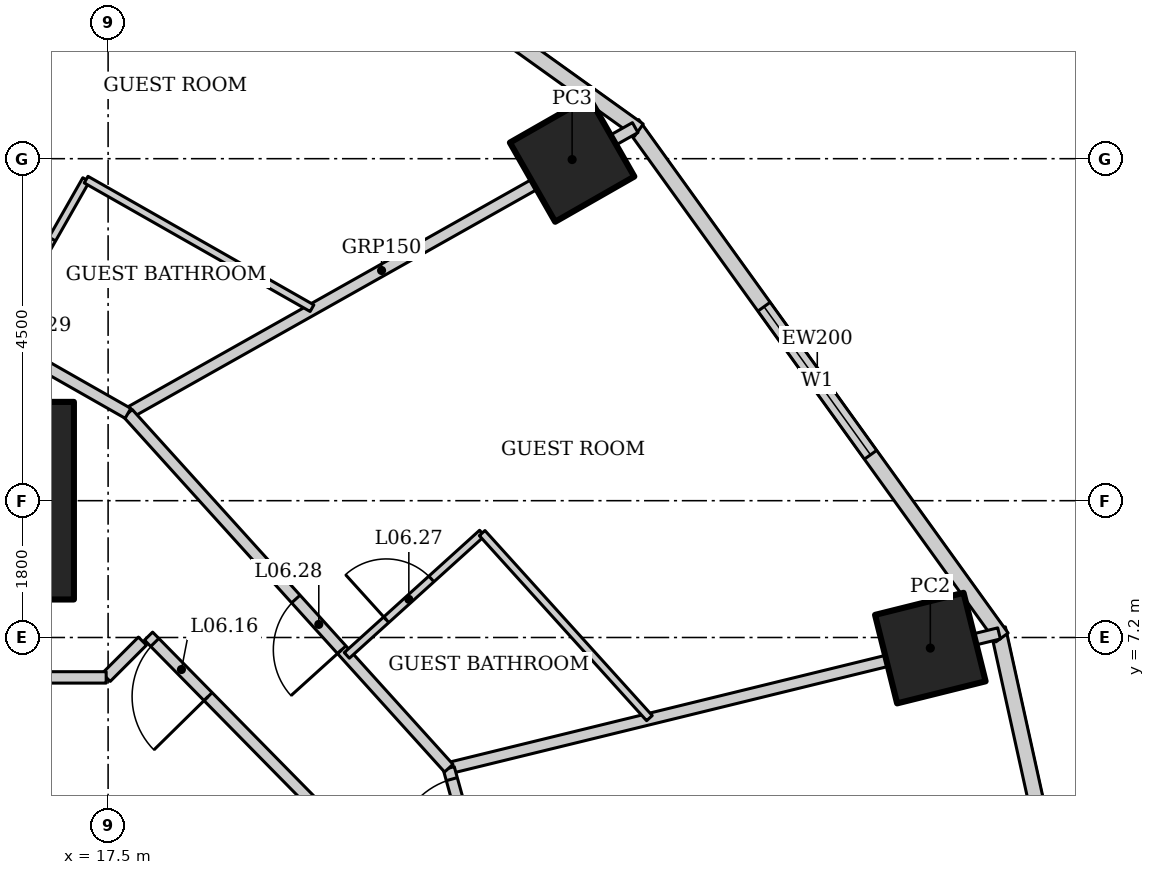
"""IFC4 building model, lengths in metres.
Left out: names, types, materials, properties, quantities, classifications, styles, units other than length and angle.
Written with IfcOpenShell. Run it as: python <this file> out.ifc"""

import sys

from ifc_helpers import new_model, si_unit, direction, frame, frame_2d, origin, origin_2d, place, context, subcontext, project, spatial, rectangle, hollow_rectangle, extrude, element, fill, save


model = new_model("IFC4")
c1 = context("Model", 3, precision=1e-05, world=origin(), true_north=direction((0.0, 1.0)))
c2 = subcontext(c1, "Body", "Model", "MODEL_VIEW")
j1 = project(units=[si_unit("LENGTHUNIT", "METRE"), si_unit("PLANEANGLEUNIT", "RADIAN")], contexts=[c1])
p1 = place(None, origin())
s1 = spatial("IfcSite", under=j1, at=p1, CompositionType="ELEMENT")
p2 = place(p1, origin())
s2 = spatial("IfcBuilding", under=s1, at=p2, CompositionType="ELEMENT")
p3 = place(p2, frame((0.0, 0.0, 37.0)))
s3 = spatial("IfcBuildingStorey", under=s2, at=p3, CompositionType="ELEMENT", Elevation=37.0)
p4 = place(p3, frame((15.75, 9.0, 0.0), z_axis=(0.0, 0.0, 1.0), x_axis=(1.0, 0.0, 0.0)))
e1 = element("IfcColumn", 1, at=p4, inside=s3, PredefinedType="COLUMN", context=c2, shape_type="SweptSolid", body=[
    extrude(hollow_rectangle(XDim=2.6, YDim=2.6, WallThickness=0.13, at=origin_2d()), origin(), (0.0, 0.0, 1.0), 3.6),
])
p5 = place(p3, frame((28.318, 7.06, 0.0), z_axis=(0.0, 0.0, 1.0), x_axis=(0.970295726276, 0.2419218956, 0.0)))
e2 = element("IfcColumn", 2, at=p5, inside=s3, PredefinedType="COLUMN", context=c2, shape_type="SweptSolid", body=[
    extrude(hollow_rectangle(XDim=1.2, YDim=1.2, WallThickness=0.1, at=origin_2d()), origin(), (0.0, 0.0, 1.0), 3.6),
])
p6 = place(p3, frame((23.605, 13.489, 0.0), z_axis=(0.0, 0.0, 1.0), x_axis=(0.86824298017, 0.496139221777, 0.0)))
e3 = element("IfcColumn", 3, at=p6, inside=s3, PredefinedType="COLUMN", context=c2, shape_type="SweptSolid", body=[
    extrude(hollow_rectangle(XDim=1.2, YDim=1.2, WallThickness=0.12, at=origin_2d()), origin(), (0.0, 0.0, 1.0), 3.6),
])
p7 = place(p3, frame((30.835, -0.067, 0.0), z_axis=(0.0, 0.0, 1.0), x_axis=(-0.215238065514, 0.976561608478, 0.0)))
e4 = element("IfcWall", 4, at=p7, inside=s3, PredefinedType="SOLIDWALL", context=c2, shape_type="SweptSolid", body=[
    extrude(rectangle(XDim=7.562, YDim=0.2, at=frame_2d((3.781, 0.0))), origin(), (0.0, 0.0, 1.0), 3.45),
])
p8 = place(p7, frame((2.581, 0.0, 0.5)))
e5 = element("IfcOpeningElement", 5, at=p8, cuts=e4, PredefinedType="OPENING", context=c2, shape_type="SweptSolid", body=[
    extrude(rectangle(XDim=2.4, YDim=2.2, at=frame_2d((1.2, 1.1))), frame((0.0, 0.11, 0.0), z_axis=(0.0, -1.0, 0.0), x_axis=(1.0, 0.0, 0.0)), (0.0, 0.0, 1.0), 0.22),
])
p9 = place(p3, frame((29.26, 7.2, 0.0), z_axis=(0.0, 0.0, 1.0), x_axis=(-0.583937613703, 0.811798536155, 0.0)))
e6 = element("IfcWall", 6, at=p9, inside=s3, PredefinedType="SOLIDWALL", context=c2, shape_type="SweptSolid", body=[
    extrude(rectangle(XDim=8.323, YDim=0.2, at=frame_2d((4.162, 0.0))), origin(), (0.0, 0.0, 1.0), 3.45),
])
p10 = place(p9, frame((2.961, 0.0, 0.5)))
e7 = element("IfcOpeningElement", 7, at=p10, cuts=e6, PredefinedType="OPENING", context=c2, shape_type="SweptSolid", body=[
    extrude(rectangle(XDim=2.4, YDim=2.2, at=frame_2d((1.2, 1.1))), frame((0.0, 0.11, 0.0), z_axis=(0.0, -1.0, 0.0), x_axis=(1.0, 0.0, 0.0)), (0.0, 0.0, 1.0), 0.22),
])
p11 = place(p3, frame((24.482, 13.875, 0.0), z_axis=(0.0, 0.0, 1.0), x_axis=(-0.812791321576, 0.582554948112, 0.0)))
e8 = element("IfcWall", 8, at=p11, inside=s3, PredefinedType="SOLIDWALL", context=c2, shape_type="SweptSolid", body=[
    extrude(rectangle(XDim=8.063, YDim=0.2, at=frame_2d((4.032, 0.0))), origin(), (0.0, 0.0, 1.0), 3.45),
])
p12 = place(p11, frame((2.832, 0.0, 0.5)))
e9 = element("IfcOpeningElement", 9, at=p12, cuts=e8, PredefinedType="OPENING", context=c2, shape_type="SweptSolid", body=[
    extrude(rectangle(XDim=2.4, YDim=2.2, at=frame_2d((1.2, 1.1))), frame((0.0, 0.11, 0.0), z_axis=(0.0, -1.0, 0.0), x_axis=(1.0, 0.0, 0.0)), (0.0, 0.0, 1.0), 0.22),
])
p13 = place(p3, frame((29.222, 7.254, 0.0), z_axis=(0.0, 0.0, 1.0), x_axis=(-0.97130070913, -0.237854855832, 0.0)))
e10 = element("IfcWall", 10, at=p13, inside=s3, PredefinedType="PARTITIONING", context=c2, shape_type="SweptSolid", body=[
    extrude(rectangle(XDim=7.454, YDim=0.15, at=frame_2d((3.727, 0.0))), origin(), (0.0, 0.0, 1.0), 2.333),
])
p14 = place(p3, frame((24.435, 13.909, 0.0), z_axis=(0.0, 0.0, 1.0), x_axis=(-0.871267209855, -0.490808974074, 0.0)))
e11 = element("IfcWall", 11, at=p14, inside=s3, PredefinedType="PARTITIONING", context=c2, shape_type="SweptSolid", body=[
    extrude(rectangle(XDim=7.659, YDim=0.15, at=frame_2d((3.83, 0.0))), origin(), (0.0, 0.0, 1.0), 2.693),
])
p15 = place(p3, frame((17.97, 18.542, 0.0), z_axis=(0.0, 0.0, 1.0), x_axis=(-0.699032031211, -0.715090357467, 0.0)))
e12 = element("IfcWall", 12, at=p15, inside=s3, PredefinedType="PARTITIONING", context=c2, shape_type="SweptSolid", body=[
    extrude(rectangle(XDim=7.647, YDim=0.15, at=frame_2d((3.824, 0.0))), origin(), (0.0, 0.0, 1.0), 2.528),
])
p16 = place(p3, frame((23.5, 0.0, 0.0), z_axis=(0.0, 0.0, 1.0), x_axis=(-0.266933062421, 0.963715072097, 0.0)))
e13 = element("IfcWall", 13, at=p16, inside=s3, PredefinedType="PARTITIONING", context=c2, shape_type="SweptSolid", body=[
    extrude(rectangle(XDim=5.687, YDim=0.15, at=frame_2d((2.844, 0.0))), origin(), (0.0, 0.0, 1.0), 3.45),
])
p17 = place(p16, frame((4.537, 0.0, 0.0)))
e14 = element("IfcOpeningElement", 14, at=p17, cuts=e13, PredefinedType="OPENING", context=c2, shape_type="SweptSolid", body=[
    extrude(rectangle(XDim=1.0, YDim=2.1, at=frame_2d((0.5, 1.05))), frame((0.0, 0.085, 0.0), z_axis=(0.0, -1.0, 0.0), x_axis=(1.0, 0.0, 0.0)), (0.0, 0.0, 1.0), 0.17),
])
p18 = place(p3, frame((21.982, 5.481, 0.0), z_axis=(0.0, 0.0, 1.0), x_axis=(-0.670598380282, 0.741820606591, 0.0)))
e15 = element("IfcWall", 15, at=p18, inside=s3, PredefinedType="PARTITIONING", context=c2, shape_type="SweptSolid", body=[
    extrude(rectangle(XDim=6.293, YDim=0.15, at=frame_2d((3.147, 0.0))), origin(), (0.0, 0.0, 1.0), 3.45),
])
p19 = place(p18, frame((2.1, 0.0, 0.0)))
e16 = element("IfcOpeningElement", 16, at=p19, cuts=e15, PredefinedType="OPENING", context=c2, shape_type="SweptSolid", body=[
    extrude(rectangle(XDim=0.9, YDim=2.1, at=frame_2d((0.45, 1.05))), frame((0.0, 0.085, 0.0), z_axis=(0.0, -1.0, 0.0), x_axis=(1.0, 0.0, 0.0)), (0.0, 0.0, 1.0), 0.17),
])
p20 = place(p3, frame((17.761, 10.149, 0.0), z_axis=(0.0, 0.0, 1.0), x_axis=(-0.86907565943, 0.494679187136, 0.0)))
e17 = element("IfcWall", 17, at=p20, inside=s3, PredefinedType="PARTITIONING", context=c2, shape_type="SweptSolid", body=[
    extrude(rectangle(XDim=5.911, YDim=0.15, at=frame_2d((2.955, 0.0))), origin(), (0.0, 0.0, 1.0), 3.45),
])
p21 = place(p20, frame((2.55, 0.0, 0.0)))
e18 = element("IfcOpeningElement", 18, at=p21, cuts=e17, PredefinedType="OPENING", context=c2, shape_type="SweptSolid", body=[
    extrude(rectangle(XDim=0.9, YDim=2.1, at=frame_2d((0.45, 1.05))), frame((0.0, 0.085, 0.0), z_axis=(0.0, -1.0, 0.0), x_axis=(1.0, 0.0, 0.0)), (0.0, 0.0, 1.0), 0.17),
])
p22 = place(p3, frame((20.641, 6.964, 0.0), z_axis=(0.0, 0.0, 1.0), x_axis=(0.741861025859, 0.670553665496, 0.0)))
e19 = element("IfcWall", 19, at=p22, inside=s3, PredefinedType="PARTITIONING", context=c2, shape_type="SweptSolid", body=[
    extrude(rectangle(XDim=2.4, YDim=0.1, at=frame_2d((1.2, 0.0))), origin(), (0.0, 0.0, 1.0), 3.45),
])
p23 = place(p22, frame((0.7, 0.0, 0.0)))
e20 = element("IfcOpeningElement", 20, at=p23, cuts=e19, PredefinedType="OPENING", context=c2, shape_type="SweptSolid", body=[
    extrude(rectangle(XDim=0.8, YDim=2.1, at=frame_2d((0.4, 1.05))), frame((0.0, 0.06, 0.0), z_axis=(0.0, -1.0, 0.0), x_axis=(1.0, 0.0, 0.0)), (0.0, 0.0, 1.0), 0.12),
])
p24 = place(p3, frame((22.421, 8.574, 0.0), z_axis=(0.0, 0.0, 1.0), x_axis=(0.670578246017, -0.741838807268, 0.0)))
e21 = element("IfcWall", 21, at=p24, inside=s3, PredefinedType="PARTITIONING", context=c2, shape_type="SweptSolid", body=[
    extrude(rectangle(XDim=3.282, YDim=0.1, at=frame_2d((1.641, 0.0))), origin(), (0.0, 0.0, 1.0), 3.45),
])
p25 = place(p3, frame((16.023, 11.139, 0.0), z_axis=(0.0, 0.0, 1.0), x_axis=(0.494659381266, 0.869086932663, 0.0)))
e22 = element("IfcWall", 22, at=p25, inside=s3, PredefinedType="PARTITIONING", context=c2, shape_type="SweptSolid", body=[
    extrude(rectangle(XDim=2.4, YDim=0.1, at=frame_2d((1.2, 0.0))), origin(), (0.0, 0.0, 1.0), 3.45),
])
p26 = place(p25, frame((0.7, 0.0, 0.0)))
e23 = element("IfcOpeningElement", 23, at=p26, cuts=e22, PredefinedType="OPENING", context=c2, shape_type="SweptSolid", body=[
    extrude(rectangle(XDim=0.8, YDim=2.1, at=frame_2d((0.4, 1.05))), frame((0.0, 0.06, 0.0), z_axis=(0.0, -1.0, 0.0), x_axis=(1.0, 0.0, 0.0)), (0.0, 0.0, 1.0), 0.12),
])
p27 = place(p3, frame((17.21, 13.225, 0.0), z_axis=(0.0, 0.0, 1.0), x_axis=(0.869041592831, -0.494739032147, 0.0)))
e24 = element("IfcWall", 24, at=p27, inside=s3, PredefinedType="PARTITIONING", context=c2, shape_type="SweptSolid", body=[
    extrude(rectangle(XDim=3.42, YDim=0.1, at=frame_2d((1.71, 0.0))), origin(), (0.0, 0.0, 1.0), 3.45),
])
p28 = place(p3, frame((20.183, 5.032, 0.0), z_axis=(0.0, 0.0, 1.0), x_axis=(-0.701392176983, 0.712775570616, 0.0)))
e25 = element("IfcWall", 25, at=p28, inside=s3, PredefinedType="PARTITIONING", context=c2, shape_type="SweptSolid", body=[
    extrude(rectangle(XDim=3.067, YDim=0.15, at=frame_2d((1.533, 0.0))), origin(), (0.0, 0.0, 1.0), 3.45),
])
p29 = place(p28, frame((1.95, 0.0, 0.0)))
e26 = element("IfcOpeningElement", 26, at=p29, cuts=e25, PredefinedType="OPENING", context=c2, shape_type="SweptSolid", body=[
    extrude(rectangle(XDim=1.0, YDim=2.1, at=frame_2d((0.5, 1.05))), frame((0.0, 0.085, 0.0), z_axis=(0.0, -1.0, 0.0), x_axis=(1.0, 0.0, 0.0)), (0.0, 0.0, 1.0), 0.17),
])
p30 = place(p3, frame((17.952, 7.152, 0.0), z_axis=(0.0, 0.0, 1.0), x_axis=(-0.707106781187, -0.707106781187, 0.0)))
e27 = element("IfcWall", 27, at=p30, inside=s3, PredefinedType="PARTITIONING", context=c2, shape_type="SweptSolid", body=[
    extrude(rectangle(XDim=0.675, YDim=0.15, at=frame_2d((0.337, 0.0))), origin(), (0.0, 0.0, 1.0), 3.45),
])
p31 = place(p3, frame((17.475, 6.675, 0.0), z_axis=(0.0, 0.0, 1.0), x_axis=(-1.0, 0.0, 0.0)))
e28 = element("IfcWall", 28, at=p31, inside=s3, PredefinedType="PARTITIONING", context=c2, shape_type="SweptSolid", body=[
    extrude(rectangle(XDim=3.245, YDim=0.15, at=frame_2d((1.622, 0.0))), origin(), (0.0, 0.0, 1.0), 3.45),
])
p32 = place(p10, origin())
e29 = element("IfcWindow", 29, at=p32, inside=s3, PartitioningType="SINGLE_PANEL", PredefinedType="WINDOW", context=c2, shape_type="SweptSolid", body=[
    extrude(rectangle(XDim=2.4, YDim=2.2, at=frame_2d((1.2, 1.1))), frame((0.0, 0.03, 0.0), z_axis=(0.0, -1.0, 0.0), x_axis=(1.0, 0.0, 0.0)), (0.0, 0.0, 1.0), 0.06),
])
fill(e7, e29)
p33 = place(p29, origin())
e30 = element("IfcDoor", 30, at=p33, inside=s3, OperationType="SINGLE_SWING_LEFT", PredefinedType="DOOR", context=c2, shape_type="SweptSolid", body=[
    extrude(rectangle(XDim=1.0, YDim=2.1, at=frame_2d((0.5, 1.05))), frame((0.0, 0.025, 0.0), z_axis=(0.0, -1.0, 0.0), x_axis=(1.0, 0.0, 0.0)), (0.0, 0.0, 1.0), 0.05),
])
fill(e26, e30)
p34 = place(p17, origin())
e31 = element("IfcDoor", 31, at=p34, inside=s3, OperationType="SINGLE_SWING_LEFT", PredefinedType="DOOR", context=c2, shape_type="SweptSolid", body=[
    extrude(rectangle(XDim=1.0, YDim=2.1, at=frame_2d((0.5, 1.05))), frame((0.0, 0.025, 0.0), z_axis=(0.0, -1.0, 0.0), x_axis=(1.0, 0.0, 0.0)), (0.0, 0.0, 1.0), 0.05),
])
fill(e14, e31)
p35 = place(p23, origin())
e32 = element("IfcDoor", 32, at=p35, inside=s3, OperationType="SINGLE_SWING_LEFT", PredefinedType="DOOR", context=c2, shape_type="SweptSolid", body=[
    extrude(rectangle(XDim=0.8, YDim=2.1, at=frame_2d((0.4, 1.05))), frame((0.0, 0.025, 0.0), z_axis=(0.0, -1.0, 0.0), x_axis=(1.0, 0.0, 0.0)), (0.0, 0.0, 1.0), 0.05),
])
fill(e20, e32)
p36 = place(p19, origin())
e33 = element("IfcDoor", 33, at=p36, inside=s3, OperationType="SINGLE_SWING_LEFT", PredefinedType="DOOR", context=c2, shape_type="SweptSolid", body=[
    extrude(rectangle(XDim=0.9, YDim=2.1, at=frame_2d((0.45, 1.05))), frame((0.0, 0.025, 0.0), z_axis=(0.0, -1.0, 0.0), x_axis=(1.0, 0.0, 0.0)), (0.0, 0.0, 1.0), 0.05),
])
fill(e16, e33)
p37 = place(p26, origin())
e34 = element("IfcDoor", 34, at=p37, inside=s3, OperationType="SINGLE_SWING_LEFT", PredefinedType="DOOR", context=c2, shape_type="SweptSolid", body=[
    extrude(rectangle(XDim=0.8, YDim=2.1, at=frame_2d((0.4, 1.05))), frame((0.0, 0.025, 0.0), z_axis=(0.0, -1.0, 0.0), x_axis=(1.0, 0.0, 0.0)), (0.0, 0.0, 1.0), 0.05),
])
fill(e23, e34)
save(model, sys.argv[1])
